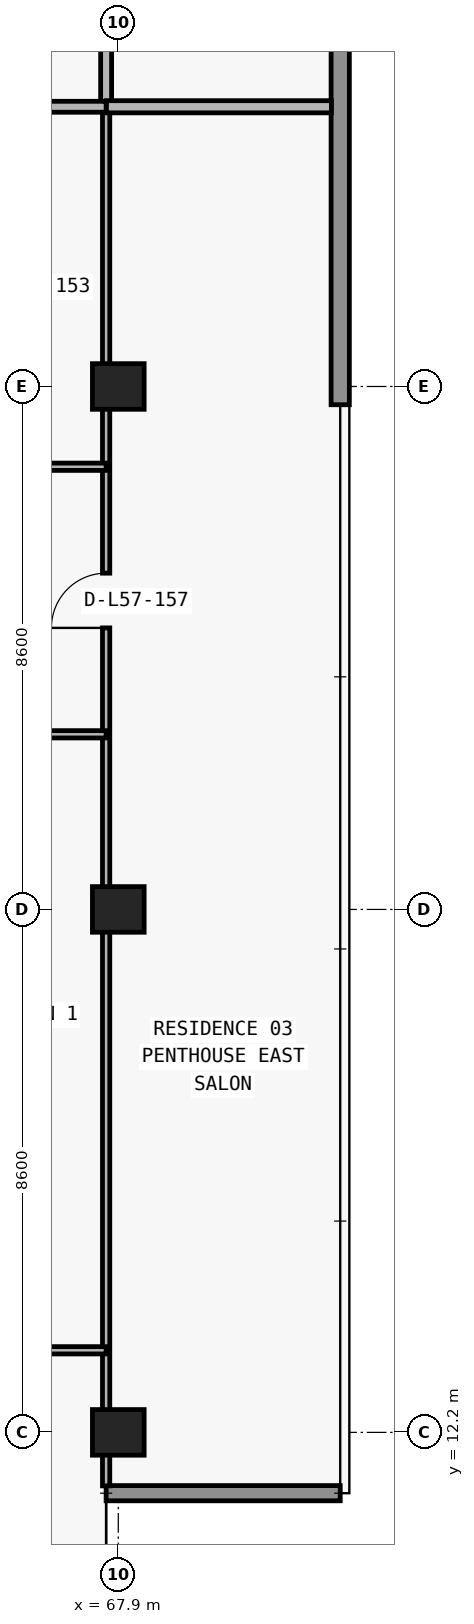
"""IFC4 building model, lengths in metres.
Left out: names, types, materials, properties, quantities, classifications, styles, units other than length and angle.
Written with IfcOpenShell. Run it as: python <this file> out.ifc"""

import sys

from ifc_helpers import new_model, si_unit, direction, frame, frame_2d, origin, origin_2d, place, context, subcontext, project, spatial, rectangle, extrude, element, fill, save


model = new_model("IFC4")
c1 = context("Model", 3, precision=1e-05, world=origin(), true_north=direction((0.0, 1.0)))
c2 = subcontext(c1, "Body", "Model", "MODEL_VIEW")
j1 = project(units=[si_unit("LENGTHUNIT", "METRE"), si_unit("PLANEANGLEUNIT", "RADIAN")], contexts=[c1])
p1 = place(None, origin())
s1 = spatial("IfcSite", under=j1, at=p1, CompositionType="ELEMENT")
p2 = place(p1, origin())
s2 = spatial("IfcBuilding", under=s1, at=p2, CompositionType="ELEMENT")
p3 = place(p2, frame((0.0, 0.0, 204.9)))
s3 = spatial("IfcBuildingStorey", under=s2, at=p3, CompositionType="ELEMENT", Elevation=204.9)
for number, where, z_axis, x_axis in (
    (1, (67.9, 12.2, 0.0), (0.0, 0.0, 1.0), (1.0, 0.0, 0.0)),
    (2, (67.9, 20.8, 0.0), (0.0, 0.0, 1.0), (1.0, 0.0, 0.0)),
    (3, (67.9, 29.4, 0.0), (0.0, 0.0, 1.0), (1.0, 0.0, 0.0)),
):
    element("IfcColumn", number, at=place(p3, frame(where, z_axis=z_axis, x_axis=x_axis)), inside=s3, PredefinedType="COLUMN", context=c2, shape_type="SweptSolid", body=[
        extrude(rectangle(XDim=0.85, YDim=0.75, at=origin_2d()), origin(), (0.0, 0.0, 1.0), 3.05),
    ])
p4 = place(p3, frame((67.7, 11.2, 0.0), z_axis=(0.0, 0.0, 1.0), x_axis=(1.0, 0.0, 0.0)))
e4 = element("IfcWall", 4, at=p4, inside=s3, PredefinedType="ELEMENTEDWALL", context=c2, shape_type="SweptSolid", body=[
    extrude(rectangle(XDim=3.85, YDim=0.25, at=frame_2d((1.925, 0.0))), origin(), (0.0, 0.0, 1.0), 3.05),
])
p5 = place(p3, frame((71.55, 47.0, 0.0), z_axis=(0.0, 0.0, 1.0), x_axis=(0.0, -1.0, 0.0)))
e5 = element("IfcWall", 5, at=p5, inside=s3, PredefinedType="STANDARD", context=c2, shape_type="SweptSolid", body=[
    extrude(rectangle(XDim=17.9, YDim=0.3, at=frame_2d((8.95, 0.0))), origin(), (0.0, 0.0, 1.0), 3.05),
])
p6 = place(p3, frame((67.7, 11.32, 0.0), z_axis=(0.0, 0.0, 1.0), x_axis=(0.0, 1.0, 0.0)))
e6 = element("IfcWall", 6, at=p6, inside=s3, PredefinedType="PARTITIONING", context=c2, shape_type="SweptSolid", body=[
    extrude(rectangle(XDim=22.68, YDim=0.12, at=frame_2d((11.34, 0.0))), origin(), (0.0, 0.0, 1.0), 2.263),
])
p7 = place(p6, frame((14.11, 0.0, 0.0)))
e7 = element("IfcOpeningElement", 7, at=p7, cuts=e6, PredefinedType="OPENING", context=c2, shape_type="SweptSolid", body=[
    extrude(rectangle(XDim=0.9, YDim=2.15, at=frame_2d((0.45, 1.075))), frame((0.0, 0.07, 0.0), z_axis=(0.0, -1.0, 0.0), x_axis=(1.0, 0.0, 0.0)), (0.0, 0.0, 1.0), 0.14),
])
p8 = place(p3, frame((67.7, 34.005, 0.0), z_axis=(0.0, 0.0, 1.0), x_axis=(0.0, 1.0, 0.0)))
e8 = element("IfcWall", 8, at=p8, inside=s3, PredefinedType="PARTITIONING", context=c2, shape_type="SweptSolid", body=[
    extrude(rectangle(XDim=2.995, YDim=0.18, at=frame_2d((1.498, 0.0))), origin(), (0.0, 0.0, 1.0), 2.263),
])
p9 = place(p3, frame((59.5, 13.55, 0.0), z_axis=(0.0, 0.0, 1.0), x_axis=(1.0, 0.0, 0.0)))
e9 = element("IfcWall", 9, at=p9, inside=s3, PredefinedType="PARTITIONING", context=c2, shape_type="SweptSolid", body=[
    extrude(rectangle(XDim=8.2, YDim=0.12, at=frame_2d((4.1, 0.0))), origin(), (0.0, 0.0, 1.0), 3.05),
])
p10 = place(p9, frame((3.65, 0.0, 0.0)))
e10 = element("IfcOpeningElement", 10, at=p10, cuts=e9, PredefinedType="OPENING", context=c2, shape_type="SweptSolid", body=[
    extrude(rectangle(XDim=0.9, YDim=2.15, at=frame_2d((0.45, 1.075))), frame((0.0, 0.07, 0.0), z_axis=(0.0, -1.0, 0.0), x_axis=(1.0, 0.0, 0.0)), (0.0, 0.0, 1.0), 0.14),
])
p11 = place(p3, frame((59.505, 23.68, 0.0), z_axis=(0.0, 0.0, 1.0), x_axis=(1.0, 0.0, 0.0)))
e11 = element("IfcWall", 11, at=p11, inside=s3, PredefinedType="PARTITIONING", context=c2, shape_type="SweptSolid", body=[
    extrude(rectangle(XDim=8.195, YDim=0.12, at=frame_2d((4.098, 0.0))), origin(), (0.0, 0.0, 1.0), 3.05),
])
p12 = place(p11, frame((3.647, 0.0, 0.0)))
e12 = element("IfcOpeningElement", 12, at=p12, cuts=e11, PredefinedType="OPENING", context=c2, shape_type="SweptSolid", body=[
    extrude(rectangle(XDim=0.9, YDim=2.15, at=frame_2d((0.45, 1.075))), frame((0.0, 0.07, 0.0), z_axis=(0.0, -1.0, 0.0), x_axis=(1.0, 0.0, 0.0)), (0.0, 0.0, 1.0), 0.14),
])
p13 = place(p3, frame((59.5, 28.08, 0.0), z_axis=(0.0, 0.0, 1.0), x_axis=(1.0, 0.0, 0.0)))
e13 = element("IfcWall", 13, at=p13, inside=s3, PredefinedType="PARTITIONING", context=c2, shape_type="SweptSolid", body=[
    extrude(rectangle(XDim=8.2, YDim=0.12, at=frame_2d((4.1, 0.0))), origin(), (0.0, 0.0, 1.0), 3.05),
])
p14 = place(p13, frame((2.839, 0.0, 0.0)))
e14 = element("IfcOpeningElement", 14, at=p14, cuts=e13, PredefinedType="OPENING", context=c2, shape_type="SweptSolid", body=[
    extrude(rectangle(XDim=0.9, YDim=2.15, at=frame_2d((0.45, 1.075))), frame((0.0, 0.07, 0.0), z_axis=(0.0, -1.0, 0.0), x_axis=(1.0, 0.0, 0.0)), (0.0, 0.0, 1.0), 0.14),
])
p15 = place(p3, frame((10.105, 34.0, 0.0), z_axis=(0.0, 0.0, 1.0), x_axis=(1.0, 0.0, 0.0)))
e15 = element("IfcWall", 15, at=p15, inside=s3, PredefinedType="PARTITIONING", context=c2, shape_type="SweptSolid", body=[
    extrude(rectangle(XDim=57.595, YDim=0.18, at=frame_2d((28.797, 0.0))), origin(), (0.0, 0.0, 1.0), 3.05),
])
p16 = place(p15, frame((2.712, 0.0, 0.0)))
e16 = element("IfcOpeningElement", 16, at=p16, cuts=e15, PredefinedType="OPENING", context=c2, shape_type="SweptSolid", body=[
    extrude(rectangle(XDim=1.0, YDim=2.2, at=frame_2d((0.5, 1.1))), frame((0.0, 0.1, 0.0), z_axis=(0.0, -1.0, 0.0), x_axis=(1.0, 0.0, 0.0)), (0.0, 0.0, 1.0), 0.2),
])
p17 = place(p15, frame((19.391, 0.0, 0.0)))
e17 = element("IfcOpeningElement", 17, at=p17, cuts=e15, PredefinedType="OPENING", context=c2, shape_type="SweptSolid", body=[
    extrude(rectangle(XDim=1.0, YDim=2.2, at=frame_2d((0.5, 1.1))), frame((0.0, 0.1, 0.0), z_axis=(0.0, -1.0, 0.0), x_axis=(1.0, 0.0, 0.0)), (0.0, 0.0, 1.0), 0.2),
])
p18 = place(p15, frame((43.794, 0.0, 0.0)))
e18 = element("IfcOpeningElement", 18, at=p18, cuts=e15, PredefinedType="OPENING", context=c2, shape_type="SweptSolid", body=[
    extrude(rectangle(XDim=1.0, YDim=2.2, at=frame_2d((0.5, 1.1))), frame((0.0, 0.1, 0.0), z_axis=(0.0, -1.0, 0.0), x_axis=(1.0, 0.0, 0.0)), (0.0, 0.0, 1.0), 0.2),
])
p19 = place(p3, frame((67.705, 34.0, 0.0), z_axis=(0.0, 0.0, 1.0), x_axis=(1.0, 0.0, 0.0)))
e19 = element("IfcWall", 19, at=p19, inside=s3, PredefinedType="PARTITIONING", context=c2, shape_type="SweptSolid", body=[
    extrude(rectangle(XDim=3.7, YDim=0.2, at=frame_2d((1.85, 0.0))), origin(), (0.0, 0.0, 1.0), 3.05),
])
p20 = place(p7, origin())
e20 = element("IfcDoor", 20, at=p20, inside=s3, OperationType="SINGLE_SWING_LEFT", PredefinedType="DOOR", context=c2, shape_type="SweptSolid", body=[
    extrude(rectangle(XDim=0.9, YDim=2.15, at=frame_2d((0.45, 1.075))), frame((0.0, 0.025, 0.0), z_axis=(0.0, -1.0, 0.0), x_axis=(1.0, 0.0, 0.0)), (0.0, 0.0, 1.0), 0.05),
])
fill(e7, e20)
save(model, sys.argv[1])
